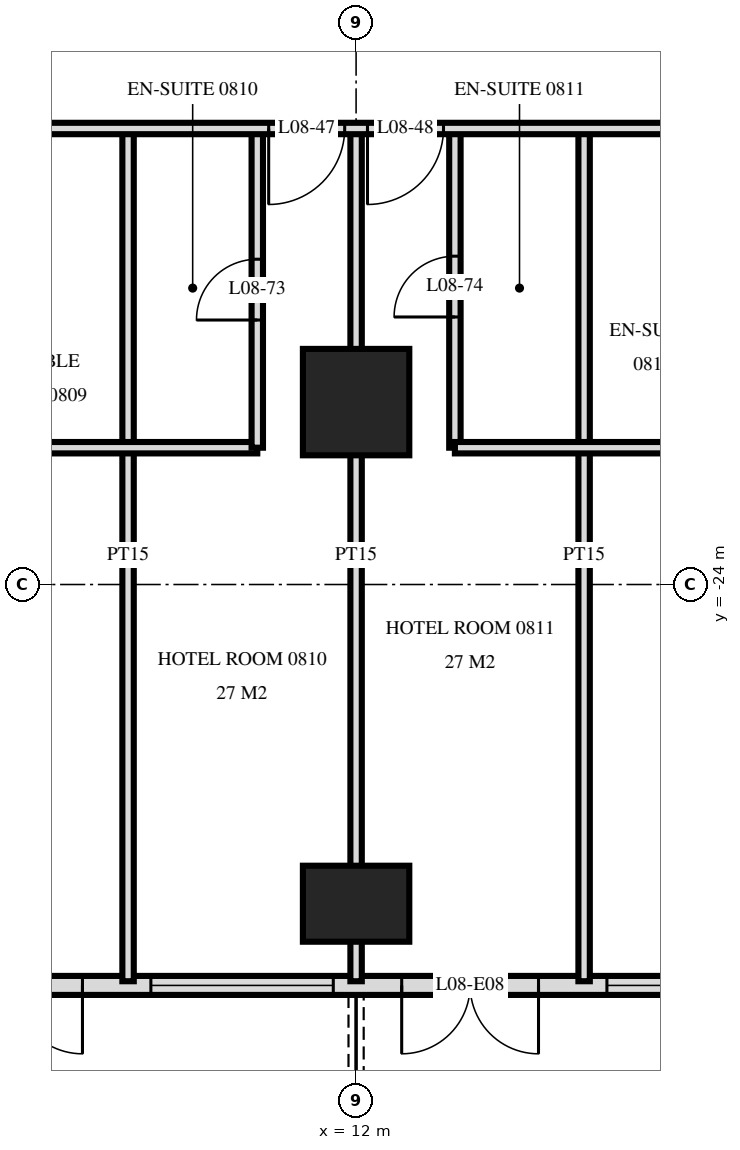
"""IFC4 building model, lengths in metres.
Left out: names, types, materials, properties, quantities, classifications, styles, units other than length and angle.
Written with IfcOpenShell. Run it as: python <this file> out.ifc"""

import sys

from ifc_helpers import new_model, si_unit, direction, frame, frame_2d, origin, origin_2d, place, context, subcontext, project, spatial, rectangle, extrude, element, fill, save


model = new_model("IFC4")
c1 = context("Model", 3, precision=1e-05, world=origin(), true_north=direction((0.0, 1.0)))
c2 = subcontext(c1, "Body", "Model", "MODEL_VIEW")
j1 = project(units=[si_unit("LENGTHUNIT", "METRE"), si_unit("PLANEANGLEUNIT", "RADIAN")], contexts=[c1])
p1 = place(None, origin())
s1 = spatial("IfcSite", under=j1, at=p1, CompositionType="ELEMENT")
p2 = place(p1, origin())
s2 = spatial("IfcBuilding", under=s1, at=p2, CompositionType="ELEMENT")
p3 = place(p2, frame((0.0, 0.0, 38.4)))
s3 = spatial("IfcBuildingStorey", under=s2, at=p3, CompositionType="ELEMENT", Elevation=38.4)
p4 = place(p3, frame((12.0, -28.2, 0.0), z_axis=(0.0, 0.0, 1.0), x_axis=(1.0, 0.0, 0.0)))
e1 = element("IfcColumn", 1, at=p4, inside=s3, PredefinedType="COLUMN", context=c2, shape_type="SweptSolid", body=[
    extrude(rectangle(XDim=1.4, YDim=1.0, at=origin_2d()), origin(), (0.0, 0.0, 1.0), 3.6),
])
p5 = place(p3, frame((12.0, -21.6, 0.0), z_axis=(0.0, 0.0, 1.0), x_axis=(1.0, 0.0, 0.0)))
e2 = element("IfcColumn", 2, at=p5, inside=s3, PredefinedType="COLUMN", context=c2, shape_type="SweptSolid", body=[
    extrude(rectangle(XDim=1.4, YDim=1.4, at=origin_2d()), origin(), (0.0, 0.0, 1.0), 3.6),
])
p6 = place(p3, frame((-28.775, -29.275, 0.0), z_axis=(0.0, 0.0, 1.0), x_axis=(1.0, 0.0, 0.0)))
e3 = element("IfcWall", 3, at=p6, inside=s3, PredefinedType="SOLIDWALL", context=c2, shape_type="SweptSolid", body=[
    extrude(rectangle(XDim=57.551, YDim=0.25, at=frame_2d((28.775, 0.0))), origin(), (0.0, 0.0, 1.0), 3.32),
])
p7 = place(p6, frame((0.575, 0.0, 0.0)))
e4 = element("IfcOpeningElement", 4, at=p7, cuts=e3, PredefinedType="OPENING", context=c2, shape_type="SweptSolid", body=[
    extrude(rectangle(XDim=1.8, YDim=2.4, at=frame_2d((0.9, 1.2))), frame((0.0, 0.135, 0.0), z_axis=(0.0, -1.0, 0.0), x_axis=(1.0, 0.0, 0.0)), (0.0, 0.0, 1.0), 0.27),
])
p8 = place(p6, frame((5.375, 0.0, 0.0)))
e5 = element("IfcOpeningElement", 5, at=p8, cuts=e3, PredefinedType="OPENING", context=c2, shape_type="SweptSolid", body=[
    extrude(rectangle(XDim=1.8, YDim=2.4, at=frame_2d((0.9, 1.2))), frame((0.0, 0.135, 0.0), z_axis=(0.0, -1.0, 0.0), x_axis=(1.0, 0.0, 0.0)), (0.0, 0.0, 1.0), 0.27),
])
p9 = place(p6, frame((8.075, 0.0, 0.3)))
e6 = element("IfcOpeningElement", 6, at=p9, cuts=e3, PredefinedType="OPENING", context=c2, shape_type="SweptSolid", body=[
    extrude(rectangle(XDim=2.4, YDim=2.1, at=frame_2d((1.2, 1.05))), frame((0.0, 0.135, 0.0), z_axis=(0.0, -1.0, 0.0), x_axis=(1.0, 0.0, 0.0)), (0.0, 0.0, 1.0), 0.27),
])
p10 = place(p6, frame((11.375, 0.0, 0.0)))
e7 = element("IfcOpeningElement", 7, at=p10, cuts=e3, PredefinedType="OPENING", context=c2, shape_type="SweptSolid", body=[
    extrude(rectangle(XDim=1.8, YDim=2.4, at=frame_2d((0.9, 1.2))), frame((0.0, 0.135, 0.0), z_axis=(0.0, -1.0, 0.0), x_axis=(1.0, 0.0, 0.0)), (0.0, 0.0, 1.0), 0.27),
])
p11 = place(p6, frame((14.075, 0.0, 0.3)))
e8 = element("IfcOpeningElement", 8, at=p11, cuts=e3, PredefinedType="OPENING", context=c2, shape_type="SweptSolid", body=[
    extrude(rectangle(XDim=2.4, YDim=2.1, at=frame_2d((1.2, 1.05))), frame((0.0, 0.135, 0.0), z_axis=(0.0, -1.0, 0.0), x_axis=(1.0, 0.0, 0.0)), (0.0, 0.0, 1.0), 0.27),
])
p12 = place(p6, frame((17.375, 0.0, 0.0)))
e9 = element("IfcOpeningElement", 9, at=p12, cuts=e3, PredefinedType="OPENING", context=c2, shape_type="SweptSolid", body=[
    extrude(rectangle(XDim=1.8, YDim=2.4, at=frame_2d((0.9, 1.2))), frame((0.0, 0.135, 0.0), z_axis=(0.0, -1.0, 0.0), x_axis=(1.0, 0.0, 0.0)), (0.0, 0.0, 1.0), 0.27),
])
p13 = place(p6, frame((20.075, 0.0, 0.3)))
e10 = element("IfcOpeningElement", 10, at=p13, cuts=e3, PredefinedType="OPENING", context=c2, shape_type="SweptSolid", body=[
    extrude(rectangle(XDim=2.4, YDim=2.1, at=frame_2d((1.2, 1.05))), frame((0.0, 0.135, 0.0), z_axis=(0.0, -1.0, 0.0), x_axis=(1.0, 0.0, 0.0)), (0.0, 0.0, 1.0), 0.27),
])
p14 = place(p6, frame((23.075, 0.0, 0.3)))
e11 = element("IfcOpeningElement", 11, at=p14, cuts=e3, PredefinedType="OPENING", context=c2, shape_type="SweptSolid", body=[
    extrude(rectangle(XDim=2.4, YDim=2.1, at=frame_2d((1.2, 1.05))), frame((0.0, 0.135, 0.0), z_axis=(0.0, -1.0, 0.0), x_axis=(1.0, 0.0, 0.0)), (0.0, 0.0, 1.0), 0.27),
])
p15 = place(p6, frame((26.375, 0.0, 0.0)))
e12 = element("IfcOpeningElement", 12, at=p15, cuts=e3, PredefinedType="OPENING", context=c2, shape_type="SweptSolid", body=[
    extrude(rectangle(XDim=1.8, YDim=2.4, at=frame_2d((0.9, 1.2))), frame((0.0, 0.135, 0.0), z_axis=(0.0, -1.0, 0.0), x_axis=(1.0, 0.0, 0.0)), (0.0, 0.0, 1.0), 0.27),
])
p16 = place(p6, frame((29.375, 0.0, 0.0)))
e13 = element("IfcOpeningElement", 13, at=p16, cuts=e3, PredefinedType="OPENING", context=c2, shape_type="SweptSolid", body=[
    extrude(rectangle(XDim=1.8, YDim=2.4, at=frame_2d((0.9, 1.2))), frame((0.0, 0.135, 0.0), z_axis=(0.0, -1.0, 0.0), x_axis=(1.0, 0.0, 0.0)), (0.0, 0.0, 1.0), 0.27),
])
p17 = place(p6, frame((32.075, 0.0, 0.3)))
e14 = element("IfcOpeningElement", 14, at=p17, cuts=e3, PredefinedType="OPENING", context=c2, shape_type="SweptSolid", body=[
    extrude(rectangle(XDim=2.4, YDim=2.1, at=frame_2d((1.2, 1.05))), frame((0.0, 0.135, 0.0), z_axis=(0.0, -1.0, 0.0), x_axis=(1.0, 0.0, 0.0)), (0.0, 0.0, 1.0), 0.27),
])
p18 = place(p6, frame((35.375, 0.0, 0.0)))
e15 = element("IfcOpeningElement", 15, at=p18, cuts=e3, PredefinedType="OPENING", context=c2, shape_type="SweptSolid", body=[
    extrude(rectangle(XDim=1.8, YDim=2.4, at=frame_2d((0.9, 1.2))), frame((0.0, 0.135, 0.0), z_axis=(0.0, -1.0, 0.0), x_axis=(1.0, 0.0, 0.0)), (0.0, 0.0, 1.0), 0.27),
])
p19 = place(p6, frame((38.075, 0.0, 0.3)))
e16 = element("IfcOpeningElement", 16, at=p19, cuts=e3, PredefinedType="OPENING", context=c2, shape_type="SweptSolid", body=[
    extrude(rectangle(XDim=2.4, YDim=2.1, at=frame_2d((1.2, 1.05))), frame((0.0, 0.135, 0.0), z_axis=(0.0, -1.0, 0.0), x_axis=(1.0, 0.0, 0.0)), (0.0, 0.0, 1.0), 0.27),
])
p20 = place(p6, frame((41.375, 0.0, 0.0)))
e17 = element("IfcOpeningElement", 17, at=p20, cuts=e3, PredefinedType="OPENING", context=c2, shape_type="SweptSolid", body=[
    extrude(rectangle(XDim=1.8, YDim=2.4, at=frame_2d((0.9, 1.2))), frame((0.0, 0.135, 0.0), z_axis=(0.0, -1.0, 0.0), x_axis=(1.0, 0.0, 0.0)), (0.0, 0.0, 1.0), 0.27),
])
p21 = place(p6, frame((44.075, 0.0, 0.3)))
e18 = element("IfcOpeningElement", 18, at=p21, cuts=e3, PredefinedType="OPENING", context=c2, shape_type="SweptSolid", body=[
    extrude(rectangle(XDim=2.4, YDim=2.1, at=frame_2d((1.2, 1.05))), frame((0.0, 0.135, 0.0), z_axis=(0.0, -1.0, 0.0), x_axis=(1.0, 0.0, 0.0)), (0.0, 0.0, 1.0), 0.27),
])
p22 = place(p6, frame((47.375, 0.0, 0.0)))
e19 = element("IfcOpeningElement", 19, at=p22, cuts=e3, PredefinedType="OPENING", context=c2, shape_type="SweptSolid", body=[
    extrude(rectangle(XDim=1.8, YDim=2.4, at=frame_2d((0.9, 1.2))), frame((0.0, 0.135, 0.0), z_axis=(0.0, -1.0, 0.0), x_axis=(1.0, 0.0, 0.0)), (0.0, 0.0, 1.0), 0.27),
])
p23 = place(p6, frame((50.075, 0.0, 0.3)))
e20 = element("IfcOpeningElement", 20, at=p23, cuts=e3, PredefinedType="OPENING", context=c2, shape_type="SweptSolid", body=[
    extrude(rectangle(XDim=2.4, YDim=2.1, at=frame_2d((1.2, 1.05))), frame((0.0, 0.135, 0.0), z_axis=(0.0, -1.0, 0.0), x_axis=(1.0, 0.0, 0.0)), (0.0, 0.0, 1.0), 0.27),
])
p24 = place(p6, frame((53.375, 0.0, 0.0)))
e21 = element("IfcOpeningElement", 21, at=p24, cuts=e3, PredefinedType="OPENING", context=c2, shape_type="SweptSolid", body=[
    extrude(rectangle(XDim=1.8, YDim=2.4, at=frame_2d((0.9, 1.2))), frame((0.0, 0.135, 0.0), z_axis=(0.0, -1.0, 0.0), x_axis=(1.0, 0.0, 0.0)), (0.0, 0.0, 1.0), 0.27),
])
p25 = place(p3, frame((15.0, -29.22, 0.0), z_axis=(0.0, 0.0, 1.0), x_axis=(0.0, 1.0, 0.0)))
e22 = element("IfcWall", 22, at=p25, inside=s3, PredefinedType="PARTITIONING", context=c2, shape_type="SweptSolid", body=[
    extrude(rectangle(XDim=11.22, YDim=0.15, at=frame_2d((5.61, 0.0))), origin(), (0.0, 0.0, 1.0), 3.32),
])
p26 = place(p3, frame((13.3, -22.2, 0.0), z_axis=(0.0, 0.0, 1.0), x_axis=(0.0, 1.0, 0.0)))
e23 = element("IfcWall", 23, at=p26, inside=s3, PredefinedType="PARTITIONING", context=c2, shape_type="SweptSolid", body=[
    extrude(rectangle(XDim=4.2, YDim=0.15, at=frame_2d((2.1, 0.0))), origin(), (0.0, 0.0, 1.0), 3.32),
])
p27 = place(p26, frame((1.72, 0.0, 0.0)))
e24 = element("IfcOpeningElement", 24, at=p27, cuts=e23, PredefinedType="OPENING", context=c2, shape_type="SweptSolid", body=[
    extrude(rectangle(XDim=0.8, YDim=2.1, at=frame_2d((0.4, 1.05))), frame((0.0, 0.085, 0.0), z_axis=(0.0, -1.0, 0.0), x_axis=(1.0, 0.0, 0.0)), (0.0, 0.0, 1.0), 0.17),
])
p28 = place(p3, frame((12.0, -29.22, 0.0), z_axis=(0.0, 0.0, 1.0), x_axis=(0.0, 1.0, 0.0)))
e25 = element("IfcWall", 25, at=p28, inside=s3, PredefinedType="PARTITIONING", context=c2, shape_type="SweptSolid", body=[
    extrude(rectangle(XDim=11.22, YDim=0.15, at=frame_2d((5.61, 0.0))), origin(), (0.0, 0.0, 1.0), 3.32),
])
p29 = place(p3, frame((10.7, -22.2, 0.0), z_axis=(0.0, 0.0, 1.0), x_axis=(0.0, 1.0, 0.0)))
e26 = element("IfcWall", 26, at=p29, inside=s3, PredefinedType="PARTITIONING", context=c2, shape_type="SweptSolid", body=[
    extrude(rectangle(XDim=4.2, YDim=0.15, at=frame_2d((2.1, 0.0))), origin(), (0.0, 0.0, 1.0), 3.32),
])
p30 = place(p29, frame((1.68, 0.0, 0.0)))
e27 = element("IfcOpeningElement", 27, at=p30, cuts=e26, PredefinedType="OPENING", context=c2, shape_type="SweptSolid", body=[
    extrude(rectangle(XDim=0.8, YDim=2.1, at=frame_2d((0.4, 1.05))), frame((0.0, 0.085, 0.0), z_axis=(0.0, -1.0, 0.0), x_axis=(1.0, 0.0, 0.0)), (0.0, 0.0, 1.0), 0.17),
])
p31 = place(p3, frame((9.0, -29.22, 0.0), z_axis=(0.0, 0.0, 1.0), x_axis=(0.0, 1.0, 0.0)))
e28 = element("IfcWall", 28, at=p31, inside=s3, PredefinedType="PARTITIONING", context=c2, shape_type="SweptSolid", body=[
    extrude(rectangle(XDim=11.22, YDim=0.15, at=frame_2d((5.61, 0.0))), origin(), (0.0, 0.0, 1.0), 3.32),
])
for number, where, z_axis, x_axis in (
    (29, (6.3, -22.2, 0.0), (0.0, 0.0, 1.0), (1.0, 0.0, 0.0)),
    (30, (13.3, -22.2, 0.0), (0.0, 0.0, 1.0), (1.0, 0.0, 0.0)),
):
    element("IfcWall", number, at=place(p3, frame(where, z_axis=z_axis, x_axis=x_axis)), inside=s3, PredefinedType="PARTITIONING", context=c2, shape_type="SweptSolid", body=[
        extrude(rectangle(XDim=4.4, YDim=0.15, at=frame_2d((2.2, 0.0))), origin(), (0.0, 0.0, 1.0), 3.32),
    ])
p32 = place(p3, frame((-33.12, -18.0, 0.0), z_axis=(0.0, 0.0, 1.0), x_axis=(1.0, 0.0, 0.0)))
e31 = element("IfcWall", 31, at=p32, inside=s3, PredefinedType="PARTITIONING", context=c2, shape_type="SweptSolid", body=[
    extrude(rectangle(XDim=66.24, YDim=0.15, at=frame_2d((33.12, 0.0))), origin(), (0.0, 0.0, 1.0), 3.32),
])
p33 = place(p32, frame((12.27, 0.0, 0.0)))
e32 = element("IfcOpeningElement", 32, at=p33, cuts=e31, PredefinedType="OPENING", context=c2, shape_type="SweptSolid", body=[
    extrude(rectangle(XDim=1.0, YDim=2.1, at=frame_2d((0.5, 1.05))), frame((0.0, 0.085, 0.0), z_axis=(0.0, -1.0, 0.0), x_axis=(1.0, 0.0, 0.0)), (0.0, 0.0, 1.0), 0.17),
])
p34 = place(p32, frame((16.97, 0.0, 0.0)))
e33 = element("IfcOpeningElement", 33, at=p34, cuts=e31, PredefinedType="OPENING", context=c2, shape_type="SweptSolid", body=[
    extrude(rectangle(XDim=1.0, YDim=2.1, at=frame_2d((0.5, 1.05))), frame((0.0, 0.085, 0.0), z_axis=(0.0, -1.0, 0.0), x_axis=(1.0, 0.0, 0.0)), (0.0, 0.0, 1.0), 0.17),
])
p35 = place(p32, frame((18.27, 0.0, 0.0)))
e34 = element("IfcOpeningElement", 34, at=p35, cuts=e31, PredefinedType="OPENING", context=c2, shape_type="SweptSolid", body=[
    extrude(rectangle(XDim=1.0, YDim=2.1, at=frame_2d((0.5, 1.05))), frame((0.0, 0.085, 0.0), z_axis=(0.0, -1.0, 0.0), x_axis=(1.0, 0.0, 0.0)), (0.0, 0.0, 1.0), 0.17),
])
p36 = place(p32, frame((22.97, 0.0, 0.0)))
e35 = element("IfcOpeningElement", 35, at=p36, cuts=e31, PredefinedType="OPENING", context=c2, shape_type="SweptSolid", body=[
    extrude(rectangle(XDim=1.0, YDim=2.1, at=frame_2d((0.5, 1.05))), frame((0.0, 0.085, 0.0), z_axis=(0.0, -1.0, 0.0), x_axis=(1.0, 0.0, 0.0)), (0.0, 0.0, 1.0), 0.17),
])
p37 = place(p32, frame((24.27, 0.0, 0.0)))
e36 = element("IfcOpeningElement", 36, at=p37, cuts=e31, PredefinedType="OPENING", context=c2, shape_type="SweptSolid", body=[
    extrude(rectangle(XDim=1.0, YDim=2.1, at=frame_2d((0.5, 1.05))), frame((0.0, 0.085, 0.0), z_axis=(0.0, -1.0, 0.0), x_axis=(1.0, 0.0, 0.0)), (0.0, 0.0, 1.0), 0.17),
])
p38 = place(p32, frame((28.97, 0.0, 0.0)))
e37 = element("IfcOpeningElement", 37, at=p38, cuts=e31, PredefinedType="OPENING", context=c2, shape_type="SweptSolid", body=[
    extrude(rectangle(XDim=1.0, YDim=2.1, at=frame_2d((0.5, 1.05))), frame((0.0, 0.085, 0.0), z_axis=(0.0, -1.0, 0.0), x_axis=(1.0, 0.0, 0.0)), (0.0, 0.0, 1.0), 0.17),
])
p39 = place(p32, frame((30.27, 0.0, 0.0)))
e38 = element("IfcOpeningElement", 38, at=p39, cuts=e31, PredefinedType="OPENING", context=c2, shape_type="SweptSolid", body=[
    extrude(rectangle(XDim=1.0, YDim=2.1, at=frame_2d((0.5, 1.05))), frame((0.0, 0.085, 0.0), z_axis=(0.0, -1.0, 0.0), x_axis=(1.0, 0.0, 0.0)), (0.0, 0.0, 1.0), 0.17),
])
p40 = place(p32, frame((34.97, 0.0, 0.0)))
e39 = element("IfcOpeningElement", 39, at=p40, cuts=e31, PredefinedType="OPENING", context=c2, shape_type="SweptSolid", body=[
    extrude(rectangle(XDim=1.0, YDim=2.1, at=frame_2d((0.5, 1.05))), frame((0.0, 0.085, 0.0), z_axis=(0.0, -1.0, 0.0), x_axis=(1.0, 0.0, 0.0)), (0.0, 0.0, 1.0), 0.17),
])
p41 = place(p32, frame((37.27, 0.0, 0.0)))
e40 = element("IfcOpeningElement", 40, at=p41, cuts=e31, PredefinedType="OPENING", context=c2, shape_type="SweptSolid", body=[
    extrude(rectangle(XDim=1.0, YDim=2.1, at=frame_2d((0.5, 1.05))), frame((0.0, 0.085, 0.0), z_axis=(0.0, -1.0, 0.0), x_axis=(1.0, 0.0, 0.0)), (0.0, 0.0, 1.0), 0.17),
])
p42 = place(p32, frame((43.97, 0.0, 0.0)))
e41 = element("IfcOpeningElement", 41, at=p42, cuts=e31, PredefinedType="OPENING", context=c2, shape_type="SweptSolid", body=[
    extrude(rectangle(XDim=1.0, YDim=2.1, at=frame_2d((0.5, 1.05))), frame((0.0, 0.085, 0.0), z_axis=(0.0, -1.0, 0.0), x_axis=(1.0, 0.0, 0.0)), (0.0, 0.0, 1.0), 0.17),
])
p43 = place(p32, frame((45.27, 0.0, 0.0)))
e42 = element("IfcOpeningElement", 42, at=p43, cuts=e31, PredefinedType="OPENING", context=c2, shape_type="SweptSolid", body=[
    extrude(rectangle(XDim=1.0, YDim=2.1, at=frame_2d((0.5, 1.05))), frame((0.0, 0.085, 0.0), z_axis=(0.0, -1.0, 0.0), x_axis=(1.0, 0.0, 0.0)), (0.0, 0.0, 1.0), 0.17),
])
p44 = place(p32, frame((51.22, 0.0, 0.0)))
e43 = element("IfcOpeningElement", 43, at=p44, cuts=e31, PredefinedType="OPENING", context=c2, shape_type="SweptSolid", body=[
    extrude(rectangle(XDim=1.0, YDim=2.1, at=frame_2d((0.5, 1.05))), frame((0.0, 0.085, 0.0), z_axis=(0.0, -1.0, 0.0), x_axis=(1.0, 0.0, 0.0)), (0.0, 0.0, 1.0), 0.17),
])
p45 = place(p32, frame((54.27, 0.0, 0.0)))
e44 = element("IfcOpeningElement", 44, at=p45, cuts=e31, PredefinedType="OPENING", context=c2, shape_type="SweptSolid", body=[
    extrude(rectangle(XDim=1.0, YDim=2.1, at=frame_2d((0.5, 1.05))), frame((0.0, 0.085, 0.0), z_axis=(0.0, -1.0, 0.0), x_axis=(1.0, 0.0, 0.0)), (0.0, 0.0, 1.0), 0.17),
])
p46 = place(p32, frame((6.07, 0.0, 0.0)))
e45 = element("IfcOpeningElement", 45, at=p46, cuts=e31, PredefinedType="OPENING", context=c2, shape_type="SweptSolid", body=[
    extrude(rectangle(XDim=1.0, YDim=2.1, at=frame_2d((0.5, 1.05))), frame((0.0, 0.085, 0.0), z_axis=(0.0, -1.0, 0.0), x_axis=(1.0, 0.0, 0.0)), (0.0, 0.0, 1.0), 0.17),
])
p47 = place(p32, frame((63.37, 0.0, 0.0)))
e46 = element("IfcOpeningElement", 46, at=p47, cuts=e31, PredefinedType="OPENING", context=c2, shape_type="SweptSolid", body=[
    extrude(rectangle(XDim=1.0, YDim=2.1, at=frame_2d((0.5, 1.05))), frame((0.0, 0.085, 0.0), z_axis=(0.0, -1.0, 0.0), x_axis=(1.0, 0.0, 0.0)), (0.0, 0.0, 1.0), 0.17),
])
p48 = place(p18, frame((0.9, 0.0, 0.0), z_axis=(0.0, 0.0, 1.0), x_axis=(-1.0, 0.0, 0.0)))
e47 = element("IfcDoor", 47, at=p48, inside=s3, OperationType="DOUBLE_DOOR_SINGLE_SWING", PredefinedType="DOOR", context=c2, shape_type="SweptSolid", body=[
    extrude(rectangle(XDim=1.8, YDim=2.4, at=frame_2d((0.0, 1.2))), frame((0.0, -0.025, 0.0), z_axis=(0.0, 1.0, 0.0), x_axis=(-1.0, 0.0, 0.0)), (0.0, 0.0, 1.0), 0.05),
])
fill(e15, e47)
p49 = place(p19, origin())
e48 = element("IfcWindow", 48, at=p49, inside=s3, PartitioningType="SINGLE_PANEL", PredefinedType="WINDOW", context=c2, shape_type="SweptSolid", body=[
    extrude(rectangle(XDim=2.4, YDim=2.1, at=frame_2d((1.2, 1.05))), frame((0.0, 0.03, 0.0), z_axis=(0.0, -1.0, 0.0), x_axis=(1.0, 0.0, 0.0)), (0.0, 0.0, 1.0), 0.06),
])
fill(e16, e48)
p50 = place(p20, frame((0.9, 0.0, 0.0), z_axis=(0.0, 0.0, 1.0), x_axis=(-1.0, 0.0, 0.0)))
e49 = element("IfcDoor", 49, at=p50, inside=s3, OperationType="DOUBLE_DOOR_SINGLE_SWING", PredefinedType="DOOR", context=c2, shape_type="SweptSolid", body=[
    extrude(rectangle(XDim=1.8, YDim=2.4, at=frame_2d((0.0, 1.2))), frame((0.0, -0.025, 0.0), z_axis=(0.0, 1.0, 0.0), x_axis=(-1.0, 0.0, 0.0)), (0.0, 0.0, 1.0), 0.05),
])
fill(e17, e49)
p51 = place(p21, origin())
e50 = element("IfcWindow", 50, at=p51, inside=s3, PartitioningType="SINGLE_PANEL", PredefinedType="WINDOW", context=c2, shape_type="SweptSolid", body=[
    extrude(rectangle(XDim=2.4, YDim=2.1, at=frame_2d((1.2, 1.05))), frame((0.0, 0.03, 0.0), z_axis=(0.0, -1.0, 0.0), x_axis=(1.0, 0.0, 0.0)), (0.0, 0.0, 1.0), 0.06),
])
fill(e18, e50)
p52 = place(p42, frame((0.5, 0.0, 0.0), z_axis=(0.0, 0.0, 1.0), x_axis=(-1.0, 0.0, 0.0)))
e51 = element("IfcDoor", 51, at=p52, inside=s3, OperationType="SINGLE_SWING_LEFT", PredefinedType="DOOR", context=c2, shape_type="SweptSolid", body=[
    extrude(rectangle(XDim=1.0, YDim=2.1, at=frame_2d((0.0, 1.05))), frame((0.0, -0.025, 0.0), z_axis=(0.0, 1.0, 0.0), x_axis=(-1.0, 0.0, 0.0)), (0.0, 0.0, 1.0), 0.05),
])
fill(e41, e51)
p53 = place(p43, frame((0.5, 0.0, 0.0), z_axis=(0.0, 0.0, 1.0), x_axis=(-1.0, 0.0, 0.0)))
e52 = element("IfcDoor", 52, at=p53, inside=s3, OperationType="SINGLE_SWING_LEFT", PredefinedType="DOOR", context=c2, shape_type="SweptSolid", body=[
    extrude(rectangle(XDim=1.0, YDim=2.1, at=frame_2d((0.0, 1.05))), frame((0.0, -0.025, 0.0), z_axis=(0.0, 1.0, 0.0), x_axis=(-1.0, 0.0, 0.0)), (0.0, 0.0, 1.0), 0.05),
])
fill(e42, e52)
p54 = place(p30, origin())
e53 = element("IfcDoor", 53, at=p54, inside=s3, OperationType="SINGLE_SWING_RIGHT", PredefinedType="DOOR", context=c2, shape_type="SweptSolid", body=[
    extrude(rectangle(XDim=0.8, YDim=2.1, at=frame_2d((0.4, 1.05))), frame((0.0, 0.025, 0.0), z_axis=(0.0, -1.0, 0.0), x_axis=(1.0, 0.0, 0.0)), (0.0, 0.0, 1.0), 0.05),
])
fill(e27, e53)
p55 = place(p27, origin())
e54 = element("IfcDoor", 54, at=p55, inside=s3, OperationType="SINGLE_SWING_RIGHT", PredefinedType="DOOR", context=c2, shape_type="SweptSolid", body=[
    extrude(rectangle(XDim=0.8, YDim=2.1, at=frame_2d((0.4, 1.05))), frame((0.0, 0.025, 0.0), z_axis=(0.0, -1.0, 0.0), x_axis=(1.0, 0.0, 0.0)), (0.0, 0.0, 1.0), 0.05),
])
fill(e24, e54)
save(model, sys.argv[1])
